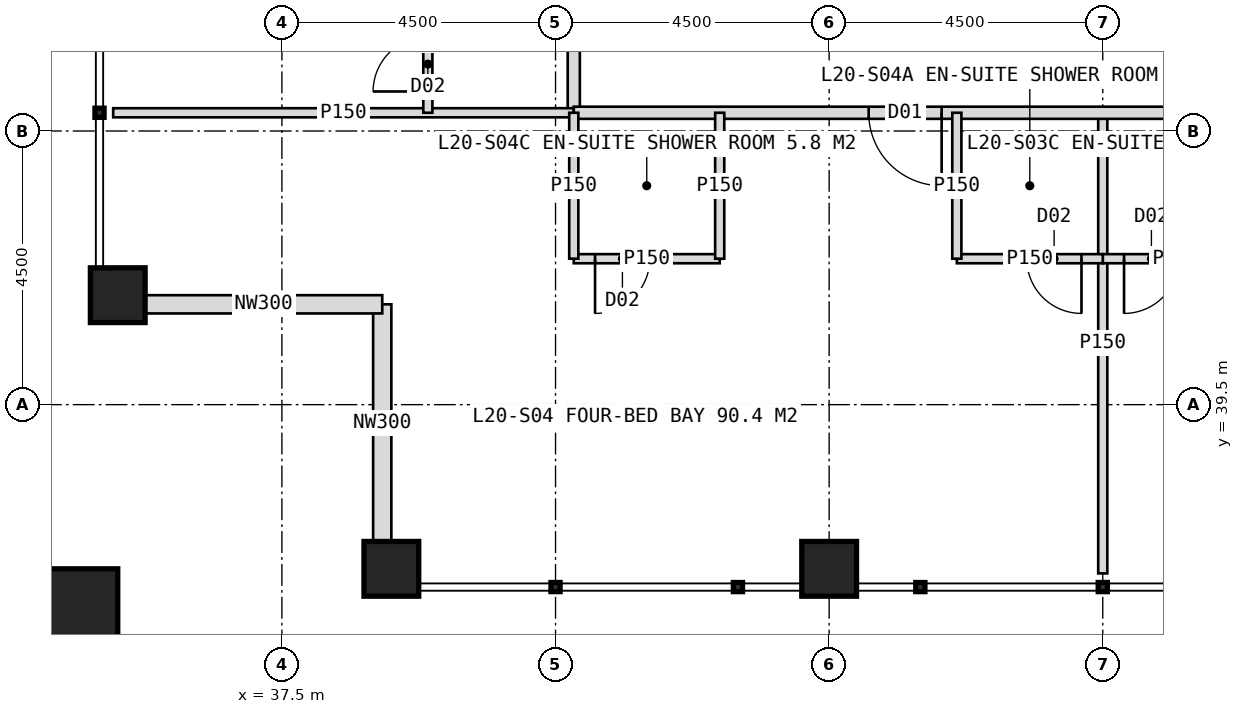
"""IFC4 building model, lengths in metres.
Left out: names, types, materials, properties, quantities, classifications, styles, units other than length and angle.
Written with IfcOpenShell. Run it as: python <this file> out.ifc"""

import sys

from ifc_helpers import new_model, si_unit, direction, frame, frame_2d, origin, origin_2d, place, context, subcontext, project, spatial, rectangle, hollow_rectangle, extrude, element, fill, save


model = new_model("IFC4")
c1 = context("Model", 3, precision=1e-05, world=origin(), true_north=direction((0.0, 1.0)))
c2 = subcontext(c1, "Body", "Model", "MODEL_VIEW")
j1 = project(units=[si_unit("LENGTHUNIT", "METRE"), si_unit("PLANEANGLEUNIT", "RADIAN")], contexts=[c1])
p1 = place(None, origin())
s1 = spatial("IfcSite", under=j1, at=p1, CompositionType="ELEMENT")
p2 = place(p1, origin())
s2 = spatial("IfcBuilding", under=s1, at=p2, CompositionType="ELEMENT")
p3 = place(p2, frame((0.0, 0.0, 87.0)))
s3 = spatial("IfcBuildingStorey", under=s2, at=p3, CompositionType="ELEMENT", Elevation=87.0)
for number, where, z_axis, x_axis in (
    (1, (39.3, 36.8, 0.0), (0.0, 0.0, 1.0), (1.0, 0.0, 0.0)),
    (2, (34.8, 41.3, 0.0), (0.0, 0.0, 1.0), (1.0, 0.0, 0.0)),
    (3, (46.5, 36.8, 0.0), (0.0, 0.0, 1.0), (1.0, 0.0, 0.0)),
):
    element("IfcColumn", number, at=place(p3, frame(where, z_axis=z_axis, x_axis=x_axis)), inside=s3, PredefinedType="COLUMN", context=c2, shape_type="SweptSolid", body=[
        extrude(hollow_rectangle(XDim=0.9, YDim=0.9, WallThickness=0.08, at=origin_2d()), origin(), (0.0, 0.0, 1.0), 4.0),
    ])
p4 = place(p3, frame((33.9, 35.9, 0.0), z_axis=(0.0, 0.0, 1.0), x_axis=(1.0, 0.0, 0.0)))
e4 = element("IfcColumn", 4, at=p4, inside=s3, PredefinedType="COLUMN", context=c2, shape_type="SweptSolid", body=[
    extrude(hollow_rectangle(XDim=1.8, YDim=1.8, WallThickness=0.1, at=origin_2d()), origin(), (0.0, 0.0, 1.0), 4.0),
])
for number, where, z_axis, x_axis in (
    (5, (39.15, 37.25, 0.0), (0.0, 0.0, 1.0), (0.0, 1.0, 0.0)),
    (6, (39.15, 41.15, 0.0), (0.0, 0.0, 1.0), (-1.0, 0.0, 0.0)),
):
    element("IfcWall", number, at=place(p3, frame(where, z_axis=z_axis, x_axis=x_axis)), inside=s3, PredefinedType="ELEMENTEDWALL", context=c2, shape_type="SweptSolid", body=[
        extrude(rectangle(XDim=3.9, YDim=0.3, at=frame_2d((1.95, 0.0))), origin(), (0.0, 0.0, 1.0), 2.95),
    ])
p5 = place(p3, frame((42.3, 44.3, 0.0), z_axis=(0.0, 0.0, 1.0), x_axis=(0.0, 1.0, 0.0)))
e7 = element("IfcWall", 7, at=p5, inside=s3, PredefinedType="PARTITIONING", context=c2, shape_type="SweptSolid", body=[
    extrude(rectangle(XDim=35.4, YDim=0.2, at=frame_2d((17.7, 0.0))), origin(), (0.0, 0.0, 1.0), 3.75),
])
p6 = place(p5, frame((2.65, 0.0, 0.0)))
e8 = element("IfcOpeningElement", 8, at=p6, cuts=e7, PredefinedType="OPENING", context=c2, shape_type="SweptSolid", body=[
    extrude(rectangle(XDim=1.2, YDim=2.2, at=frame_2d((0.6, 1.1))), frame((0.0, 0.11, 0.0), z_axis=(0.0, -1.0, 0.0), x_axis=(1.0, 0.0, 0.0)), (0.0, 0.0, 1.0), 0.22),
])
p7 = place(p5, frame((11.35, 0.0, 0.0)))
e9 = element("IfcOpeningElement", 9, at=p7, cuts=e7, PredefinedType="OPENING", context=c2, shape_type="SweptSolid", body=[
    extrude(rectangle(XDim=1.2, YDim=2.2, at=frame_2d((0.6, 1.1))), frame((0.0, 0.11, 0.0), z_axis=(0.0, -1.0, 0.0), x_axis=(1.0, 0.0, 0.0)), (0.0, 0.0, 1.0), 0.22),
])
p8 = place(p5, frame((20.35, 0.0, 0.0)))
e10 = element("IfcOpeningElement", 10, at=p8, cuts=e7, PredefinedType="OPENING", context=c2, shape_type="SweptSolid", body=[
    extrude(rectangle(XDim=1.2, YDim=2.2, at=frame_2d((0.6, 1.1))), frame((0.0, 0.11, 0.0), z_axis=(0.0, -1.0, 0.0), x_axis=(1.0, 0.0, 0.0)), (0.0, 0.0, 1.0), 0.22),
])
p9 = place(p5, frame((26.35, 0.0, 0.0)))
e11 = element("IfcOpeningElement", 11, at=p9, cuts=e7, PredefinedType="OPENING", context=c2, shape_type="SweptSolid", body=[
    extrude(rectangle(XDim=1.2, YDim=2.2, at=frame_2d((0.6, 1.1))), frame((0.0, 0.11, 0.0), z_axis=(0.0, -1.0, 0.0), x_axis=(1.0, 0.0, 0.0)), (0.0, 0.0, 1.0), 0.22),
])
p10 = place(p5, frame((30.85, 0.0, 0.0)))
e12 = element("IfcOpeningElement", 12, at=p10, cuts=e7, PredefinedType="OPENING", context=c2, shape_type="SweptSolid", body=[
    extrude(rectangle(XDim=1.2, YDim=2.2, at=frame_2d((0.6, 1.1))), frame((0.0, 0.11, 0.0), z_axis=(0.0, -1.0, 0.0), x_axis=(1.0, 0.0, 0.0)), (0.0, 0.0, 1.0), 0.22),
])
p11 = place(p3, frame((42.3, 44.3, 0.0), z_axis=(0.0, 0.0, 1.0), x_axis=(-1.0, 0.0, 0.0)))
e13 = element("IfcWall", 13, at=p11, inside=s3, PredefinedType="PARTITIONING", context=c2, shape_type="SweptSolid", body=[
    extrude(rectangle(XDim=7.575, YDim=0.15, at=frame_2d((3.788, 0.0))), origin(), (0.0, 0.0, 1.0), 3.75),
])
p12 = place(p3, frame((39.9, 44.3, 0.0), z_axis=(0.0, 0.0, 1.0), x_axis=(0.0, 1.0, 0.0)))
e14 = element("IfcWall", 14, at=p12, inside=s3, PredefinedType="PARTITIONING", context=c2, shape_type="SweptSolid", body=[
    extrude(rectangle(XDim=2.4, YDim=0.15, at=frame_2d((1.2, 0.0))), origin(), (0.0, 0.0, 1.0), 3.75),
])
p13 = place(p12, frame((0.35, 0.0, 0.0)))
e15 = element("IfcOpeningElement", 15, at=p13, cuts=e14, PredefinedType="OPENING", context=c2, shape_type="SweptSolid", body=[
    extrude(rectangle(XDim=0.9, YDim=2.1, at=frame_2d((0.45, 1.05))), frame((0.0, 0.085, 0.0), z_axis=(0.0, -1.0, 0.0), x_axis=(1.0, 0.0, 0.0)), (0.0, 0.0, 1.0), 0.17),
])
p14 = place(p3, frame((51.0, 44.3, 0.0), z_axis=(0.0, 0.0, 1.0), x_axis=(0.0, -1.0, 0.0)))
e16 = element("IfcWall", 16, at=p14, inside=s3, PredefinedType="PARTITIONING", context=c2, shape_type="SweptSolid", body=[
    extrude(rectangle(XDim=7.575, YDim=0.15, at=frame_2d((3.788, 0.0))), origin(), (0.0, 0.0, 1.0), 3.75),
])
p15 = place(p3, frame((77.7, 44.3, 0.0), z_axis=(0.0, 0.0, 1.0), x_axis=(-1.0, 0.0, 0.0)))
e17 = element("IfcWall", 17, at=p15, inside=s3, PredefinedType="PARTITIONING", context=c2, shape_type="SweptSolid", body=[
    extrude(rectangle(XDim=35.4, YDim=0.2, at=frame_2d((17.7, 0.0))), origin(), (0.0, 0.0, 1.0), 3.75),
])
p16 = place(p15, frame((2.65, 0.0, 0.0)))
e18 = element("IfcOpeningElement", 18, at=p16, cuts=e17, PredefinedType="OPENING", context=c2, shape_type="SweptSolid", body=[
    extrude(rectangle(XDim=1.2, YDim=2.2, at=frame_2d((0.6, 1.1))), frame((0.0, 0.11, 0.0), z_axis=(0.0, -1.0, 0.0), x_axis=(1.0, 0.0, 0.0)), (0.0, 0.0, 1.0), 0.22),
])
p17 = place(p15, frame((11.35, 0.0, 0.0)))
e19 = element("IfcOpeningElement", 19, at=p17, cuts=e17, PredefinedType="OPENING", context=c2, shape_type="SweptSolid", body=[
    extrude(rectangle(XDim=1.2, YDim=2.2, at=frame_2d((0.6, 1.1))), frame((0.0, 0.11, 0.0), z_axis=(0.0, -1.0, 0.0), x_axis=(1.0, 0.0, 0.0)), (0.0, 0.0, 1.0), 0.22),
])
p18 = place(p15, frame((20.35, 0.0, 0.0)))
e20 = element("IfcOpeningElement", 20, at=p18, cuts=e17, PredefinedType="OPENING", context=c2, shape_type="SweptSolid", body=[
    extrude(rectangle(XDim=1.2, YDim=2.2, at=frame_2d((0.6, 1.1))), frame((0.0, 0.11, 0.0), z_axis=(0.0, -1.0, 0.0), x_axis=(1.0, 0.0, 0.0)), (0.0, 0.0, 1.0), 0.22),
])
p19 = place(p15, frame((29.35, 0.0, 0.0)))
e21 = element("IfcOpeningElement", 21, at=p19, cuts=e17, PredefinedType="OPENING", context=c2, shape_type="SweptSolid", body=[
    extrude(rectangle(XDim=1.2, YDim=2.2, at=frame_2d((0.6, 1.1))), frame((0.0, 0.11, 0.0), z_axis=(0.0, -1.0, 0.0), x_axis=(1.0, 0.0, 0.0)), (0.0, 0.0, 1.0), 0.22),
])
p20 = place(p3, frame((53.4, 41.9, 0.0), z_axis=(0.0, 0.0, 1.0), x_axis=(-1.0, 0.0, 0.0)))
e22 = element("IfcWall", 22, at=p20, inside=s3, PredefinedType="PARTITIONING", context=c2, shape_type="SweptSolid", body=[
    extrude(rectangle(XDim=2.4, YDim=0.15, at=frame_2d((1.2, 0.0))), origin(), (0.0, 0.0, 1.0), 3.75),
])
p21 = place(p20, frame((1.15, 0.0, 0.0)))
e23 = element("IfcOpeningElement", 23, at=p21, cuts=e22, PredefinedType="OPENING", context=c2, shape_type="SweptSolid", body=[
    extrude(rectangle(XDim=0.9, YDim=2.1, at=frame_2d((0.45, 1.05))), frame((0.0, 0.085, 0.0), z_axis=(0.0, -1.0, 0.0), x_axis=(1.0, 0.0, 0.0)), (0.0, 0.0, 1.0), 0.17),
])
p22 = place(p3, frame((51.0, 41.9, 0.0), z_axis=(0.0, 0.0, 1.0), x_axis=(-1.0, 0.0, 0.0)))
e24 = element("IfcWall", 24, at=p22, inside=s3, PredefinedType="PARTITIONING", context=c2, shape_type="SweptSolid", body=[
    extrude(rectangle(XDim=2.4, YDim=0.15, at=frame_2d((1.2, 0.0))), origin(), (0.0, 0.0, 1.0), 3.75),
])
p23 = place(p22, frame((0.35, 0.0, 0.0)))
e25 = element("IfcOpeningElement", 25, at=p23, cuts=e24, PredefinedType="OPENING", context=c2, shape_type="SweptSolid", body=[
    extrude(rectangle(XDim=0.9, YDim=2.1, at=frame_2d((0.45, 1.05))), frame((0.0, 0.085, 0.0), z_axis=(0.0, -1.0, 0.0), x_axis=(1.0, 0.0, 0.0)), (0.0, 0.0, 1.0), 0.17),
])
p24 = place(p3, frame((48.6, 44.3, 0.0), z_axis=(0.0, 0.0, 1.0), x_axis=(0.0, -1.0, 0.0)))
e26 = element("IfcWall", 26, at=p24, inside=s3, PredefinedType="PARTITIONING", context=c2, shape_type="SweptSolid", body=[
    extrude(rectangle(XDim=2.4, YDim=0.15, at=frame_2d((1.2, 0.0))), origin(), (0.0, 0.0, 1.0), 3.75),
])
p25 = place(p3, frame((44.7, 41.9, 0.0), z_axis=(0.0, 0.0, 1.0), x_axis=(-1.0, 0.0, 0.0)))
e27 = element("IfcWall", 27, at=p25, inside=s3, PredefinedType="PARTITIONING", context=c2, shape_type="SweptSolid", body=[
    extrude(rectangle(XDim=2.4, YDim=0.15, at=frame_2d((1.2, 0.0))), origin(), (0.0, 0.0, 1.0), 3.75),
])
p26 = place(p25, frame((1.15, 0.0, 0.0)))
e28 = element("IfcOpeningElement", 28, at=p26, cuts=e27, PredefinedType="OPENING", context=c2, shape_type="SweptSolid", body=[
    extrude(rectangle(XDim=0.9, YDim=2.1, at=frame_2d((0.45, 1.05))), frame((0.0, 0.085, 0.0), z_axis=(0.0, -1.0, 0.0), x_axis=(1.0, 0.0, 0.0)), (0.0, 0.0, 1.0), 0.17),
])
for number, where, z_axis, x_axis in (
    (29, (44.7, 44.3, 0.0), (0.0, 0.0, 1.0), (0.0, -1.0, 0.0)),
    (30, (42.3, 44.3, 0.0), (0.0, 0.0, 1.0), (0.0, -1.0, 0.0)),
):
    element("IfcWall", number, at=place(p3, frame(where, z_axis=z_axis, x_axis=x_axis)), inside=s3, PredefinedType="PARTITIONING", context=c2, shape_type="SweptSolid", body=[
        extrude(rectangle(XDim=2.4, YDim=0.15, at=frame_2d((1.2, 0.0))), origin(), (0.0, 0.0, 1.0), 3.75),
    ])
p27 = place(p13, origin())
e31 = element("IfcDoor", 31, at=p27, inside=s3, OperationType="SINGLE_SWING_LEFT", PredefinedType="DOOR", context=c2, shape_type="SweptSolid", body=[
    extrude(rectangle(XDim=0.9, YDim=2.1, at=frame_2d((0.45, 1.05))), frame((0.0, 0.025, 0.0), z_axis=(0.0, -1.0, 0.0), x_axis=(1.0, 0.0, 0.0)), (0.0, 0.0, 1.0), 0.05),
])
fill(e15, e31)
p28 = place(p21, origin())
e32 = element("IfcDoor", 32, at=p28, inside=s3, OperationType="SINGLE_SWING_RIGHT", PredefinedType="DOOR", context=c2, shape_type="SweptSolid", body=[
    extrude(rectangle(XDim=0.9, YDim=2.1, at=frame_2d((0.45, 1.05))), frame((0.0, 0.025, 0.0), z_axis=(0.0, -1.0, 0.0), x_axis=(1.0, 0.0, 0.0)), (0.0, 0.0, 1.0), 0.05),
])
fill(e23, e32)
p29 = place(p19, origin())
e33 = element("IfcDoor", 33, at=p29, inside=s3, OperationType="SINGLE_SWING_LEFT", PredefinedType="DOOR", context=c2, shape_type="SweptSolid", body=[
    extrude(rectangle(XDim=1.2, YDim=2.2, at=frame_2d((0.6, 1.1))), frame((0.0, 0.025, 0.0), z_axis=(0.0, -1.0, 0.0), x_axis=(1.0, 0.0, 0.0)), (0.0, 0.0, 1.0), 0.05),
])
fill(e21, e33)
p30 = place(p23, origin())
e34 = element("IfcDoor", 34, at=p30, inside=s3, OperationType="SINGLE_SWING_LEFT", PredefinedType="DOOR", context=c2, shape_type="SweptSolid", body=[
    extrude(rectangle(XDim=0.9, YDim=2.1, at=frame_2d((0.45, 1.05))), frame((0.0, 0.025, 0.0), z_axis=(0.0, -1.0, 0.0), x_axis=(1.0, 0.0, 0.0)), (0.0, 0.0, 1.0), 0.05),
])
fill(e25, e34)
p31 = place(p26, origin())
e35 = element("IfcDoor", 35, at=p31, inside=s3, OperationType="SINGLE_SWING_RIGHT", PredefinedType="DOOR", context=c2, shape_type="SweptSolid", body=[
    extrude(rectangle(XDim=0.9, YDim=2.1, at=frame_2d((0.45, 1.05))), frame((0.0, 0.025, 0.0), z_axis=(0.0, -1.0, 0.0), x_axis=(1.0, 0.0, 0.0)), (0.0, 0.0, 1.0), 0.05),
])
fill(e28, e35)
save(model, sys.argv[1])
